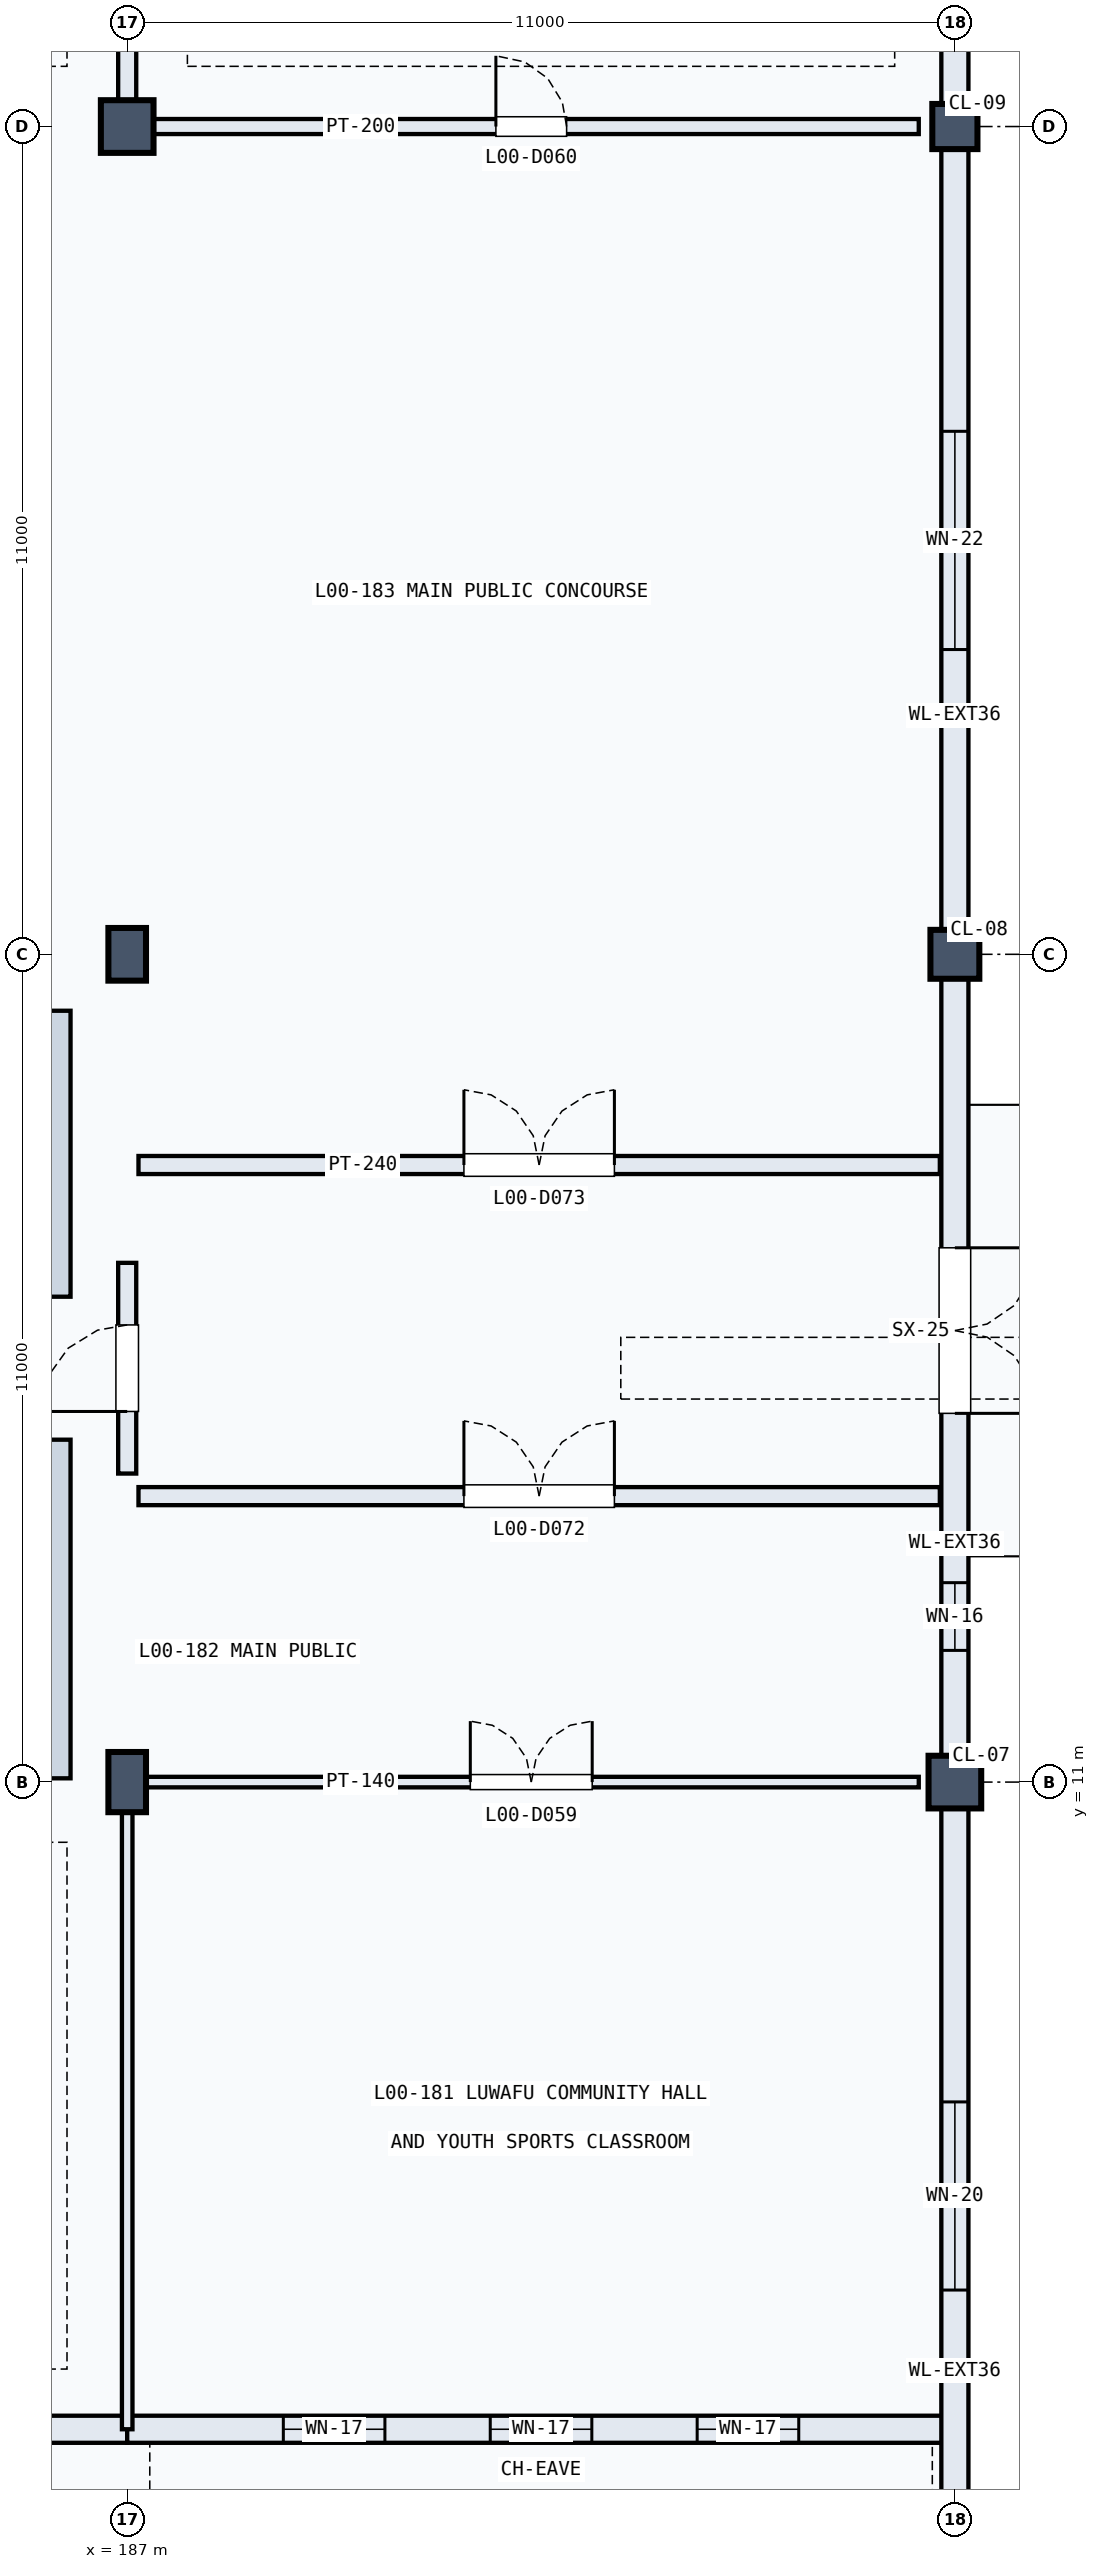
"""IFC4 building model, lengths in metres.
Left out: names, types, materials, properties, quantities, classifications, styles, units other than length and angle.
Written with IfcOpenShell. Run it as: python <this file> out.ifc"""

import sys

from ifc_helpers import new_model, si_unit, direction, frame, frame_2d, origin, origin_2d, place, context, subcontext, project, spatial, rectangle, extrude, element, fill, save


model = new_model("IFC4")
c1 = context("Model", 3, precision=1e-05, world=origin(), true_north=direction((0.0, 1.0)))
c2 = subcontext(c1, "Body", "Model", "MODEL_VIEW")
j1 = project(units=[si_unit("LENGTHUNIT", "METRE"), si_unit("PLANEANGLEUNIT", "RADIAN")], contexts=[c1])
p1 = place(None, origin())
s1 = spatial("IfcSite", under=j1, at=p1, CompositionType="ELEMENT")
p2 = place(p1, origin())
s2 = spatial("IfcBuilding", under=s1, at=p2, CompositionType="ELEMENT")
p3 = place(p2, origin())
s3 = spatial("IfcBuildingStorey", under=s2, at=p3, CompositionType="ELEMENT", Elevation=0.0)
p4 = place(p3, frame((187.0, 11.0, 0.0), z_axis=(0.0, 0.0, 1.0), x_axis=(1.0, 0.0, 0.0)))
e1 = element("IfcColumn", 1, at=p4, inside=s3, PredefinedType="COLUMN", context=c2, shape_type="SweptSolid", body=[
    extrude(rectangle(XDim=0.5, YDim=0.8, at=origin_2d()), origin(), (0.0, 0.0, 1.0), 5.4),
])
p5 = place(p3, frame((187.0, 22.0, 0.0), z_axis=(0.0, 0.0, 1.0), x_axis=(1.0, 0.0, 0.0)))
e2 = element("IfcColumn", 2, at=p5, inside=s3, PredefinedType="COLUMN", context=c2, shape_type="SweptSolid", body=[
    extrude(rectangle(XDim=0.5, YDim=0.7, at=origin_2d()), origin(), (0.0, 0.0, 1.0), 5.4),
])
for number, where, z_axis, x_axis in (
    (3, (187.0, 33.0, 0.0), (0.0, 0.0, 1.0), (1.0, 0.0, 0.0)),
    (4, (198.0, 11.0, 0.0), (0.0, 0.0, 1.0), (1.0, 0.0, 0.0)),
):
    element("IfcColumn", number, at=place(p3, frame(where, z_axis=z_axis, x_axis=x_axis)), inside=s3, PredefinedType="COLUMN", context=c2, shape_type="SweptSolid", body=[
        extrude(rectangle(XDim=0.7, YDim=0.7, at=origin_2d()), origin(), (0.0, 0.0, 1.0), 5.4),
    ])
p6 = place(p3, frame((198.0, 22.0, 0.0), z_axis=(0.0, 0.0, 1.0), x_axis=(1.0, 0.0, 0.0)))
e5 = element("IfcColumn", 5, at=p6, inside=s3, PredefinedType="COLUMN", context=c2, shape_type="SweptSolid", body=[
    extrude(rectangle(XDim=0.65, YDim=0.65, at=origin_2d()), origin(), (0.0, 0.0, 1.0), 5.4),
])
p7 = place(p3, frame((198.0, 33.0, 0.0), z_axis=(0.0, 0.0, 1.0), x_axis=(1.0, 0.0, 0.0)))
e6 = element("IfcColumn", 6, at=p7, inside=s3, PredefinedType="COLUMN", context=c2, shape_type="SweptSolid", body=[
    extrude(rectangle(XDim=0.6, YDim=0.6, at=origin_2d()), origin(), (0.0, 0.0, 1.0), 5.4),
])
p8 = place(p3, frame((176.0, 2.4, 0.0), z_axis=(0.0, 0.0, 1.0), x_axis=(1.0, 0.0, 0.0)))
e7 = element("IfcWall", 7, at=p8, inside=s3, PredefinedType="SOLIDWALL", context=c2, shape_type="SweptSolid", body=[
    extrude(rectangle(XDim=11.0, YDim=0.36, at=frame_2d((5.5, 0.0))), origin(), (0.0, 0.0, 1.0), 4.45),
])
p9 = place(p8, frame((4.1, 0.0, 0.95)))
e8 = element("IfcOpeningElement", 8, at=p9, cuts=e7, PredefinedType="OPENING", context=c2, shape_type="SweptSolid", body=[
    extrude(rectangle(XDim=2.8, YDim=1.5, at=frame_2d((1.4, 0.75))), frame((0.0, 0.19, 0.0), z_axis=(0.0, -1.0, 0.0), x_axis=(1.0, 0.0, 0.0)), (0.0, 0.0, 1.0), 0.38),
])
p10 = place(p3, frame((187.0, 2.4, 0.0), z_axis=(0.0, 0.0, 1.0), x_axis=(1.0, 0.0, 0.0)))
e9 = element("IfcWall", 9, at=p10, inside=s3, PredefinedType="SOLIDWALL", context=c2, shape_type="SweptSolid", body=[
    extrude(rectangle(XDim=11.0, YDim=0.36, at=frame_2d((5.5, 0.0))), origin(), (0.0, 0.0, 1.0), 4.45),
])
p11 = place(p10, frame((2.075, 0.0, 0.8)))
e10 = element("IfcOpeningElement", 10, at=p11, cuts=e9, PredefinedType="OPENING", context=c2, shape_type="SweptSolid", body=[
    extrude(rectangle(XDim=1.35, YDim=2.1, at=frame_2d((0.675, 1.05))), frame((0.0, 0.19, 0.0), z_axis=(0.0, -1.0, 0.0), x_axis=(1.0, 0.0, 0.0)), (0.0, 0.0, 1.0), 0.38),
])
p12 = place(p10, frame((4.825, 0.0, 0.8)))
e11 = element("IfcOpeningElement", 11, at=p12, cuts=e9, PredefinedType="OPENING", context=c2, shape_type="SweptSolid", body=[
    extrude(rectangle(XDim=1.35, YDim=2.1, at=frame_2d((0.675, 1.05))), frame((0.0, 0.19, 0.0), z_axis=(0.0, -1.0, 0.0), x_axis=(1.0, 0.0, 0.0)), (0.0, 0.0, 1.0), 0.38),
])
p13 = place(p10, frame((7.575, 0.0, 0.8)))
e12 = element("IfcOpeningElement", 12, at=p13, cuts=e9, PredefinedType="OPENING", context=c2, shape_type="SweptSolid", body=[
    extrude(rectangle(XDim=1.35, YDim=2.1, at=frame_2d((0.675, 1.05))), frame((0.0, 0.19, 0.0), z_axis=(0.0, -1.0, 0.0), x_axis=(1.0, 0.0, 0.0)), (0.0, 0.0, 1.0), 0.38),
])
p14 = place(p3, frame((198.0, 0.22, 0.0), z_axis=(0.0, 0.0, 1.0), x_axis=(0.0, 1.0, 0.0)))
e13 = element("IfcWall", 13, at=p14, inside=s3, PredefinedType="SOLIDWALL", context=c2, shape_type="SweptSolid", body=[
    extrude(rectangle(XDim=10.56, YDim=0.36, at=frame_2d((5.28, 0.0))), origin(), (0.0, 0.0, 1.0), 4.55),
])
p15 = place(p14, frame((4.03, 0.0, 1.0)))
e14 = element("IfcOpeningElement", 14, at=p15, cuts=e13, PredefinedType="OPENING", context=c2, shape_type="SweptSolid", body=[
    extrude(rectangle(XDim=2.5, YDim=1.35, at=frame_2d((1.25, 0.675))), frame((0.0, 0.19, 0.0), z_axis=(0.0, -1.0, 0.0), x_axis=(1.0, 0.0, 0.0)), (0.0, 0.0, 1.0), 0.38),
])
p16 = place(p3, frame((198.0, 11.22, 0.0), z_axis=(0.0, 0.0, 1.0), x_axis=(0.0, 1.0, 0.0)))
e15 = element("IfcWall", 15, at=p16, inside=s3, PredefinedType="SOLIDWALL", context=c2, shape_type="SweptSolid", body=[
    extrude(rectangle(XDim=10.56, YDim=0.36, at=frame_2d((5.28, 0.0))), origin(), (0.0, 0.0, 1.0), 4.45),
])
p17 = place(p16, frame((4.68, 0.0, 0.0)))
e16 = element("IfcOpeningElement", 16, at=p17, cuts=e15, PredefinedType="OPENING", context=c2, shape_type="SweptSolid", body=[
    extrude(rectangle(XDim=2.2, YDim=2.35, at=frame_2d((1.1, 1.175))), frame((0.0, 0.19, 0.0), z_axis=(0.0, -1.0, 0.0), x_axis=(1.0, 0.0, 0.0)), (0.0, 0.0, 1.0), 0.38),
])
p18 = place(p16, frame((1.53, 0.0, 0.8)))
e17 = element("IfcOpeningElement", 17, at=p18, cuts=e15, PredefinedType="OPENING", context=c2, shape_type="SweptSolid", body=[
    extrude(rectangle(XDim=0.9, YDim=1.8, at=frame_2d((0.45, 0.9))), frame((0.0, 0.19, 0.0), z_axis=(0.0, -1.0, 0.0), x_axis=(1.0, 0.0, 0.0)), (0.0, 0.0, 1.0), 0.38),
])
p19 = place(p3, frame((198.0, 22.22, 0.0), z_axis=(0.0, 0.0, 1.0), x_axis=(0.0, 1.0, 0.0)))
e18 = element("IfcWall", 18, at=p19, inside=s3, PredefinedType="SOLIDWALL", context=c2, shape_type="SweptSolid", body=[
    extrude(rectangle(XDim=10.56, YDim=0.36, at=frame_2d((5.28, 0.0))), origin(), (0.0, 0.0, 1.0), 4.45),
])
p20 = place(p19, frame((3.83, 0.0, 0.8)))
e19 = element("IfcOpeningElement", 19, at=p20, cuts=e18, PredefinedType="OPENING", context=c2, shape_type="SweptSolid", body=[
    extrude(rectangle(XDim=2.9, YDim=2.15, at=frame_2d((1.45, 1.075))), frame((0.0, 0.19, 0.0), z_axis=(0.0, -1.0, 0.0), x_axis=(1.0, 0.0, 0.0)), (0.0, 0.0, 1.0), 0.38),
])
p21 = place(p3, frame((198.0, 33.22, 0.0), z_axis=(0.0, 0.0, 1.0), x_axis=(0.0, 1.0, 0.0)))
e20 = element("IfcWall", 20, at=p21, inside=s3, PredefinedType="SOLIDWALL", context=c2, shape_type="SweptSolid", body=[
    extrude(rectangle(XDim=10.56, YDim=0.36, at=frame_2d((5.28, 0.0))), origin(), (0.0, 0.0, 1.0), 4.1),
])
p22 = place(p21, frame((1.74, 0.0, 0.85)))
e21 = element("IfcOpeningElement", 21, at=p22, cuts=e20, PredefinedType="OPENING", context=c2, shape_type="SweptSolid", body=[
    extrude(rectangle(XDim=1.8, YDim=2.1, at=frame_2d((0.9, 1.05))), frame((0.0, 0.19, 0.0), z_axis=(0.0, -1.0, 0.0), x_axis=(1.0, 0.0, 0.0)), (0.0, 0.0, 1.0), 0.38),
])
p23 = place(p21, frame((4.38, 0.0, 0.85)))
e22 = element("IfcOpeningElement", 22, at=p23, cuts=e20, PredefinedType="OPENING", context=c2, shape_type="SweptSolid", body=[
    extrude(rectangle(XDim=1.8, YDim=2.1, at=frame_2d((0.9, 1.05))), frame((0.0, 0.19, 0.0), z_axis=(0.0, -1.0, 0.0), x_axis=(1.0, 0.0, 0.0)), (0.0, 0.0, 1.0), 0.38),
])
p24 = place(p21, frame((7.02, 0.0, 0.85)))
e23 = element("IfcOpeningElement", 23, at=p24, cuts=e20, PredefinedType="OPENING", context=c2, shape_type="SweptSolid", body=[
    extrude(rectangle(XDim=1.8, YDim=2.1, at=frame_2d((0.9, 1.05))), frame((0.0, 0.19, 0.0), z_axis=(0.0, -1.0, 0.0), x_axis=(1.0, 0.0, 0.0)), (0.0, 0.0, 1.0), 0.38),
])
p25 = place(p3, frame((186.072, 11.05, 0.0), z_axis=(0.0, 0.0, 1.0), x_axis=(0.0, 1.0, 0.0)))
e24 = element("IfcWall", 24, at=p25, inside=s3, PredefinedType="SOLIDWALL", context=c2, shape_type="SweptSolid", body=[
    extrude(rectangle(XDim=4.5, YDim=0.35, at=frame_2d((2.25, 0.0))), origin(), (0.0, 0.0, 1.0), 5.06),
])
p26 = place(p3, frame((186.072, 17.45, 0.0), z_axis=(0.0, 0.0, 1.0), x_axis=(0.0, 1.0, 0.0)))
e25 = element("IfcWall", 25, at=p26, inside=s3, PredefinedType="SOLIDWALL", context=c2, shape_type="SweptSolid", body=[
    extrude(rectangle(XDim=3.8, YDim=0.35, at=frame_2d((1.9, 0.0))), origin(), (0.0, 0.0, 1.0), 5.06),
])
p27 = place(p3, frame((187.22, 11.0, 0.0), z_axis=(0.0, 0.0, 1.0), x_axis=(1.0, 0.0, 0.0)))
e26 = element("IfcWall", 26, at=p27, inside=s3, PredefinedType="PARTITIONING", context=c2, shape_type="SweptSolid", body=[
    extrude(rectangle(XDim=10.3, YDim=0.14, at=frame_2d((5.15, 0.0))), origin(), (0.0, 0.0, 1.0), 4.25),
])
p28 = place(p27, frame((4.34, 0.0, 0.0)))
e27 = element("IfcOpeningElement", 27, at=p28, cuts=e26, PredefinedType="OPENING", context=c2, shape_type="SweptSolid", body=[
    extrude(rectangle(XDim=1.62, YDim=2.25, at=frame_2d((0.81, 1.125))), frame((0.0, 0.08, 0.0), z_axis=(0.0, -1.0, 0.0), x_axis=(1.0, 0.0, 0.0)), (0.0, 0.0, 1.0), 0.16),
])
p29 = place(p3, frame((187.22, 33.0, 0.0), z_axis=(0.0, 0.0, 1.0), x_axis=(1.0, 0.0, 0.0)))
e28 = element("IfcWall", 28, at=p29, inside=s3, PredefinedType="PARTITIONING", context=c2, shape_type="SweptSolid", body=[
    extrude(rectangle(XDim=10.3, YDim=0.2, at=frame_2d((5.15, 0.0))), origin(), (0.0, 0.0, 1.0), 4.3),
])
p30 = place(p29, frame((4.68, 0.0, 0.0)))
e29 = element("IfcOpeningElement", 29, at=p30, cuts=e28, PredefinedType="OPENING", context=c2, shape_type="SweptSolid", body=[
    extrude(rectangle(XDim=0.94, YDim=2.15, at=frame_2d((0.47, 1.075))), frame((0.0, 0.11, 0.0), z_axis=(0.0, -1.0, 0.0), x_axis=(1.0, 0.0, 0.0)), (0.0, 0.0, 1.0), 0.22),
])
p31 = place(p3, frame((187.0, 2.4, 0.0), z_axis=(0.0, 0.0, 1.0), x_axis=(0.0, 1.0, 0.0)))
e30 = element("IfcWall", 30, at=p31, inside=s3, PredefinedType="PARTITIONING", context=c2, shape_type="SweptSolid", body=[
    extrude(rectangle(XDim=8.38, YDim=0.14, at=frame_2d((4.19, 0.0))), origin(), (0.0, 0.0, 1.0), 4.25),
])
p32 = place(p3, frame((187.0, 33.22, 0.0), z_axis=(0.0, 0.0, 1.0), x_axis=(0.0, 1.0, 0.0)))
e31 = element("IfcWall", 31, at=p32, inside=s3, PredefinedType="PARTITIONING", context=c2, shape_type="SweptSolid", body=[
    extrude(rectangle(XDim=10.56, YDim=0.24, at=frame_2d((5.28, 0.0))), origin(), (0.0, 0.0, 1.0), 4.1),
])
p33 = place(p3, frame((187.15, 14.8, 0.0), z_axis=(0.0, 0.0, 1.0), x_axis=(1.0, 0.0, 0.0)))
e32 = element("IfcWall", 32, at=p33, inside=s3, PredefinedType="PARTITIONING", context=c2, shape_type="SweptSolid", body=[
    extrude(rectangle(XDim=10.65, YDim=0.24, at=frame_2d((5.325, 0.0))), origin(), (0.0, 0.0, 1.0), 4.25),
])
p34 = place(p33, frame((4.325, 0.0, 0.0)))
e33 = element("IfcOpeningElement", 33, at=p34, cuts=e32, PredefinedType="OPENING", context=c2, shape_type="SweptSolid", body=[
    extrude(rectangle(XDim=2.0, YDim=2.25, at=frame_2d((1.0, 1.125))), frame((0.0, 0.13, 0.0), z_axis=(0.0, -1.0, 0.0), x_axis=(1.0, 0.0, 0.0)), (0.0, 0.0, 1.0), 0.26),
])
p35 = place(p3, frame((187.15, 19.2, 0.0), z_axis=(0.0, 0.0, 1.0), x_axis=(1.0, 0.0, 0.0)))
e34 = element("IfcWall", 34, at=p35, inside=s3, PredefinedType="PARTITIONING", context=c2, shape_type="SweptSolid", body=[
    extrude(rectangle(XDim=10.65, YDim=0.24, at=frame_2d((5.325, 0.0))), origin(), (0.0, 0.0, 1.0), 4.25),
])
p36 = place(p35, frame((4.325, 0.0, 0.0)))
e35 = element("IfcOpeningElement", 35, at=p36, cuts=e34, PredefinedType="OPENING", context=c2, shape_type="SweptSolid", body=[
    extrude(rectangle(XDim=2.0, YDim=2.25, at=frame_2d((1.0, 1.125))), frame((0.0, 0.13, 0.0), z_axis=(0.0, -1.0, 0.0), x_axis=(1.0, 0.0, 0.0)), (0.0, 0.0, 1.0), 0.26),
])
p37 = place(p3, frame((187.0, 15.1, 0.0), z_axis=(0.0, 0.0, 1.0), x_axis=(0.0, 1.0, 0.0)))
e36 = element("IfcWall", 36, at=p37, inside=s3, PredefinedType="PARTITIONING", context=c2, shape_type="SweptSolid", body=[
    extrude(rectangle(XDim=2.8, YDim=0.24, at=frame_2d((1.4, 0.0))), origin(), (0.0, 0.0, 1.0), 4.25),
])
p38 = place(p37, frame((0.825, 0.0, 0.0)))
e37 = element("IfcOpeningElement", 37, at=p38, cuts=e36, PredefinedType="OPENING", context=c2, shape_type="SweptSolid", body=[
    extrude(rectangle(XDim=1.15, YDim=2.2, at=frame_2d((0.575, 1.1))), frame((0.0, 0.13, 0.0), z_axis=(0.0, -1.0, 0.0), x_axis=(1.0, 0.0, 0.0)), (0.0, 0.0, 1.0), 0.26),
])
p39 = place(p17, frame((2.2, 0.0, 0.0), z_axis=(0.0, 0.0, 1.0), x_axis=(-1.0, 0.0, 0.0)))
e38 = element("IfcDoor", 38, at=p39, inside=s3, OperationType="DOUBLE_DOOR_SINGLE_SWING", PredefinedType="DOOR", context=c2, shape_type="SweptSolid", body=[
    extrude(rectangle(XDim=2.2, YDim=2.35, at=frame_2d((1.1, 1.175))), frame((0.0, 0.025, 0.0), z_axis=(0.0, -1.0, 0.0), x_axis=(1.0, 0.0, 0.0)), (0.0, 0.0, 1.0), 0.05),
])
fill(e16, e38)
p40 = place(p11, origin())
e39 = element("IfcWindow", 39, at=p40, inside=s3, PartitioningType="SINGLE_PANEL", PredefinedType="WINDOW", context=c2, shape_type="SweptSolid", body=[
    extrude(rectangle(XDim=1.35, YDim=2.1, at=frame_2d((0.675, 1.05))), frame((0.0, 0.03, 0.0), z_axis=(0.0, -1.0, 0.0), x_axis=(1.0, 0.0, 0.0)), (0.0, 0.0, 1.0), 0.06),
])
fill(e10, e39)
p41 = place(p12, origin())
e40 = element("IfcWindow", 40, at=p41, inside=s3, PartitioningType="SINGLE_PANEL", PredefinedType="WINDOW", context=c2, shape_type="SweptSolid", body=[
    extrude(rectangle(XDim=1.35, YDim=2.1, at=frame_2d((0.675, 1.05))), frame((0.0, 0.03, 0.0), z_axis=(0.0, -1.0, 0.0), x_axis=(1.0, 0.0, 0.0)), (0.0, 0.0, 1.0), 0.06),
])
fill(e11, e40)
p42 = place(p13, origin())
e41 = element("IfcWindow", 41, at=p42, inside=s3, PartitioningType="SINGLE_PANEL", PredefinedType="WINDOW", context=c2, shape_type="SweptSolid", body=[
    extrude(rectangle(XDim=1.35, YDim=2.1, at=frame_2d((0.675, 1.05))), frame((0.0, 0.03, 0.0), z_axis=(0.0, -1.0, 0.0), x_axis=(1.0, 0.0, 0.0)), (0.0, 0.0, 1.0), 0.06),
])
fill(e12, e41)
p43 = place(p15, origin())
e42 = element("IfcWindow", 42, at=p43, inside=s3, PartitioningType="SINGLE_PANEL", PredefinedType="WINDOW", context=c2, shape_type="SweptSolid", body=[
    extrude(rectangle(XDim=2.5, YDim=1.35, at=frame_2d((1.25, 0.675))), frame((0.0, 0.03, 0.0), z_axis=(0.0, -1.0, 0.0), x_axis=(1.0, 0.0, 0.0)), (0.0, 0.0, 1.0), 0.06),
])
fill(e14, e42)
p44 = place(p18, origin())
e43 = element("IfcWindow", 43, at=p44, inside=s3, PartitioningType="SINGLE_PANEL", PredefinedType="WINDOW", context=c2, shape_type="SweptSolid", body=[
    extrude(rectangle(XDim=0.9, YDim=1.8, at=frame_2d((0.45, 0.9))), frame((0.0, 0.03, 0.0), z_axis=(0.0, -1.0, 0.0), x_axis=(1.0, 0.0, 0.0)), (0.0, 0.0, 1.0), 0.06),
])
fill(e17, e43)
p45 = place(p20, origin())
e44 = element("IfcWindow", 44, at=p45, inside=s3, PartitioningType="SINGLE_PANEL", PredefinedType="WINDOW", context=c2, shape_type="SweptSolid", body=[
    extrude(rectangle(XDim=2.9, YDim=2.15, at=frame_2d((1.45, 1.075))), frame((0.0, 0.03, 0.0), z_axis=(0.0, -1.0, 0.0), x_axis=(1.0, 0.0, 0.0)), (0.0, 0.0, 1.0), 0.06),
])
fill(e19, e44)
p46 = place(p28, origin())
e45 = element("IfcDoor", 45, at=p46, inside=s3, OperationType="DOUBLE_DOOR_SINGLE_SWING", PredefinedType="DOOR", context=c2, shape_type="SweptSolid", body=[
    extrude(rectangle(XDim=1.62, YDim=2.25, at=frame_2d((0.81, 1.125))), frame((0.0, 0.025, 0.0), z_axis=(0.0, -1.0, 0.0), x_axis=(1.0, 0.0, 0.0)), (0.0, 0.0, 1.0), 0.05),
])
fill(e27, e45)
p47 = place(p30, origin())
e46 = element("IfcDoor", 46, at=p47, inside=s3, OperationType="SINGLE_SWING_LEFT", PredefinedType="DOOR", context=c2, shape_type="SweptSolid", body=[
    extrude(rectangle(XDim=0.94, YDim=2.15, at=frame_2d((0.47, 1.075))), frame((0.0, 0.025, 0.0), z_axis=(0.0, -1.0, 0.0), x_axis=(1.0, 0.0, 0.0)), (0.0, 0.0, 1.0), 0.05),
])
fill(e29, e46)
p48 = place(p34, origin())
e47 = element("IfcDoor", 47, at=p48, inside=s3, OperationType="DOUBLE_DOOR_SINGLE_SWING", PredefinedType="DOOR", context=c2, shape_type="SweptSolid", body=[
    extrude(rectangle(XDim=2.0, YDim=2.25, at=frame_2d((1.0, 1.125))), frame((0.0, 0.025, 0.0), z_axis=(0.0, -1.0, 0.0), x_axis=(1.0, 0.0, 0.0)), (0.0, 0.0, 1.0), 0.05),
])
fill(e33, e47)
p49 = place(p36, origin())
e48 = element("IfcDoor", 48, at=p49, inside=s3, OperationType="DOUBLE_DOOR_SINGLE_SWING", PredefinedType="DOOR", context=c2, shape_type="SweptSolid", body=[
    extrude(rectangle(XDim=2.0, YDim=2.25, at=frame_2d((1.0, 1.125))), frame((0.0, 0.025, 0.0), z_axis=(0.0, -1.0, 0.0), x_axis=(1.0, 0.0, 0.0)), (0.0, 0.0, 1.0), 0.05),
])
fill(e35, e48)
p50 = place(p38, origin())
e49 = element("IfcDoor", 49, at=p50, inside=s3, OperationType="SINGLE_SWING_LEFT", PredefinedType="DOOR", context=c2, shape_type="SweptSolid", body=[
    extrude(rectangle(XDim=1.15, YDim=2.2, at=frame_2d((0.575, 1.1))), frame((0.0, 0.025, 0.0), z_axis=(0.0, -1.0, 0.0), x_axis=(1.0, 0.0, 0.0)), (0.0, 0.0, 1.0), 0.05),
])
fill(e37, e49)
save(model, sys.argv[1])
